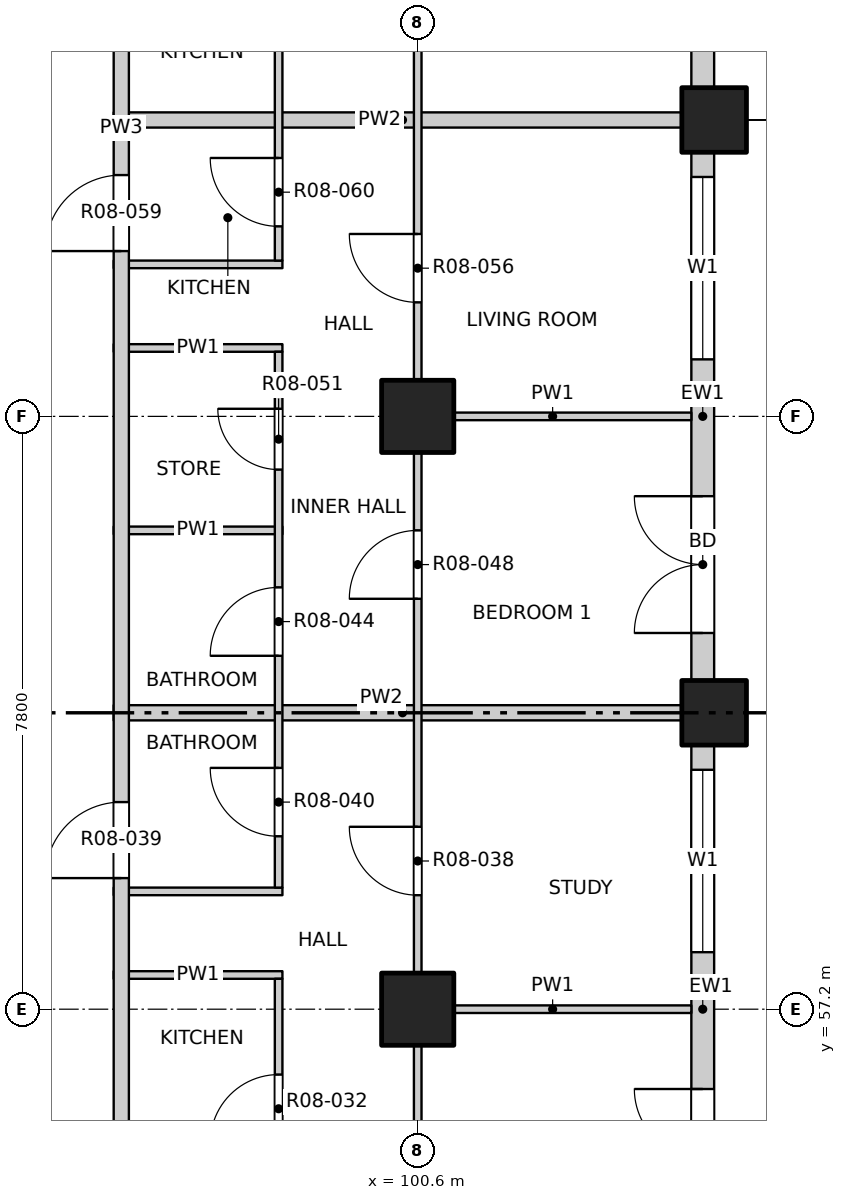
"""IFC4 building model, lengths in metres.
Left out: names, types, materials, properties, quantities, classifications, styles, units other than length and angle.
Written with IfcOpenShell. Run it as: python <this file> out.ifc"""

import sys

from ifc_helpers import new_model, si_unit, direction, frame, frame_2d, origin, origin_2d, place, context, subcontext, project, spatial, rectangle, extrude, element, fill, save


model = new_model("IFC4")
c1 = context("Model", 3, precision=1e-05, world=origin(), true_north=direction((0.0, 1.0)))
c2 = subcontext(c1, "Body", "Model", "MODEL_VIEW")
j1 = project(units=[si_unit("LENGTHUNIT", "METRE"), si_unit("PLANEANGLEUNIT", "RADIAN")], contexts=[c1])
p1 = place(None, origin())
s1 = spatial("IfcSite", under=j1, at=p1, CompositionType="ELEMENT")
p2 = place(p1, origin())
s2 = spatial("IfcBuilding", under=s1, at=p2, CompositionType="ELEMENT")
p3 = place(p2, frame((0.0, 0.0, 103.3)))
s3 = spatial("IfcBuildingStorey", under=s2, at=p3, CompositionType="ELEMENT", Elevation=103.3)
for number, where, z_axis, x_axis in (
    (1, (104.5, 61.1, -0.25), (0.0, 0.0, 1.0), (1.0, 0.0, 0.0)),
    (2, (104.5, 68.9, -0.25), (0.0, 0.0, 1.0), (1.0, 0.0, 0.0)),
):
    element("IfcColumn", number, at=place(p3, frame(where, z_axis=z_axis, x_axis=x_axis)), inside=s3, PredefinedType="COLUMN", context=c2, shape_type="SweptSolid", body=[
        extrude(rectangle(XDim=0.85, YDim=0.85, at=origin_2d()), origin(), (0.0, 0.0, 1.0), 3.4),
    ])
for number, where, z_axis, x_axis in (
    (3, (100.6, 57.2, -0.25), (0.0, 0.0, 1.0), (1.0, 0.0, 0.0)),
    (4, (100.6, 65.0, -0.25), (0.0, 0.0, 1.0), (1.0, 0.0, 0.0)),
):
    element("IfcColumn", number, at=place(p3, frame(where, z_axis=z_axis, x_axis=x_axis)), inside=s3, PredefinedType="COLUMN", context=c2, shape_type="SweptSolid", body=[
        extrude(rectangle(XDim=0.95, YDim=0.95, at=origin_2d()), origin(), (0.0, 0.0, 1.0), 3.4),
    ])
p4 = place(p3, frame((104.35, 53.725, 0.0), z_axis=(0.0, 0.0, 1.0), x_axis=(0.0, 1.0, 0.0)))
e5 = element("IfcWall", 5, at=p4, inside=s3, PredefinedType="SOLIDWALL", context=c2, shape_type="SweptSolid", body=[
    extrude(rectangle(XDim=6.95, YDim=0.3, at=frame_2d((3.475, 0.0))), origin(), (0.0, 0.0, 1.0), 2.7),
])
p5 = place(p4, frame((0.625, 0.0, 0.0)))
e6 = element("IfcOpeningElement", 6, at=p5, cuts=e5, PredefinedType="OPENING", context=c2, shape_type="SweptSolid", body=[
    extrude(rectangle(XDim=1.8, YDim=2.4, at=frame_2d((0.9, 1.2))), frame((0.0, 0.16, 0.0), z_axis=(0.0, -1.0, 0.0), x_axis=(1.0, 0.0, 0.0)), (0.0, 0.0, 1.0), 0.32),
])
p6 = place(p4, frame((4.225, 0.0, 0.9)))
e7 = element("IfcOpeningElement", 7, at=p6, cuts=e5, PredefinedType="OPENING", context=c2, shape_type="SweptSolid", body=[
    extrude(rectangle(XDim=2.4, YDim=1.8, at=frame_2d((1.2, 0.9))), frame((0.0, 0.16, 0.0), z_axis=(0.0, -1.0, 0.0), x_axis=(1.0, 0.0, 0.0)), (0.0, 0.0, 1.0), 0.32),
])
p7 = place(p3, frame((104.35, 61.525, 0.0), z_axis=(0.0, 0.0, 1.0), x_axis=(0.0, 1.0, 0.0)))
e8 = element("IfcWall", 8, at=p7, inside=s3, PredefinedType="SOLIDWALL", context=c2, shape_type="SweptSolid", body=[
    extrude(rectangle(XDim=6.95, YDim=0.3, at=frame_2d((3.475, 0.0))), origin(), (0.0, 0.0, 1.0), 2.7),
])
p8 = place(p7, frame((0.625, 0.0, 0.0)))
e9 = element("IfcOpeningElement", 9, at=p8, cuts=e8, PredefinedType="OPENING", context=c2, shape_type="SweptSolid", body=[
    extrude(rectangle(XDim=1.8, YDim=2.4, at=frame_2d((0.9, 1.2))), frame((0.0, 0.16, 0.0), z_axis=(0.0, -1.0, 0.0), x_axis=(1.0, 0.0, 0.0)), (0.0, 0.0, 1.0), 0.32),
])
p9 = place(p7, frame((4.225, 0.0, 0.9)))
e10 = element("IfcOpeningElement", 10, at=p9, cuts=e8, PredefinedType="OPENING", context=c2, shape_type="SweptSolid", body=[
    extrude(rectangle(XDim=2.4, YDim=1.8, at=frame_2d((1.2, 0.9))), frame((0.0, 0.16, 0.0), z_axis=(0.0, -1.0, 0.0), x_axis=(1.0, 0.0, 0.0)), (0.0, 0.0, 1.0), 0.32),
])
p10 = place(p3, frame((104.35, 69.325, 0.0), z_axis=(0.0, 0.0, 1.0), x_axis=(0.0, 1.0, 0.0)))
e11 = element("IfcWall", 11, at=p10, inside=s3, PredefinedType="SOLIDWALL", context=c2, shape_type="SweptSolid", body=[
    extrude(rectangle(XDim=6.95, YDim=0.3, at=frame_2d((3.475, 0.0))), origin(), (0.0, 0.0, 1.0), 2.7),
])
p11 = place(p10, frame((0.625, 0.0, 0.0)))
e12 = element("IfcOpeningElement", 12, at=p11, cuts=e11, PredefinedType="OPENING", context=c2, shape_type="SweptSolid", body=[
    extrude(rectangle(XDim=1.8, YDim=2.4, at=frame_2d((0.9, 1.2))), frame((0.0, 0.16, 0.0), z_axis=(0.0, -1.0, 0.0), x_axis=(1.0, 0.0, 0.0)), (0.0, 0.0, 1.0), 0.32),
])
p12 = place(p10, frame((4.225, 0.0, 0.9)))
e13 = element("IfcOpeningElement", 13, at=p12, cuts=e11, PredefinedType="OPENING", context=c2, shape_type="SweptSolid", body=[
    extrude(rectangle(XDim=2.4, YDim=1.8, at=frame_2d((1.2, 0.9))), frame((0.0, 0.16, 0.0), z_axis=(0.0, -1.0, 0.0), x_axis=(1.0, 0.0, 0.0)), (0.0, 0.0, 1.0), 0.32),
])
p13 = place(p3, frame((100.55, 57.2, 0.0), z_axis=(0.0, 0.0, 1.0), x_axis=(1.0, 0.0, 0.0)))
e14 = element("IfcWall", 14, at=p13, inside=s3, PredefinedType="PARTITIONING", context=c2, shape_type="SweptSolid", body=[
    extrude(rectangle(XDim=3.65, YDim=0.1, at=frame_2d((1.825, 0.0))), origin(), (0.0, 0.0, 1.0), 3.15),
])
for number, where, z_axis, x_axis in (
    (15, (96.6, 57.65, 0.0), (0.0, 0.0, 1.0), (1.0, 0.0, 0.0)),
    (16, (96.6, 58.75, 0.0), (0.0, 0.0, 1.0), (1.0, 0.0, 0.0)),
):
    element("IfcWall", number, at=place(p3, frame(where, z_axis=z_axis, x_axis=x_axis)), inside=s3, PredefinedType="PARTITIONING", context=c2, shape_type="SweptSolid", body=[
        extrude(rectangle(XDim=2.22, YDim=0.1, at=frame_2d((1.11, 0.0))), origin(), (0.0, 0.0, 1.0), 3.15),
    ])
p14 = place(p3, frame((96.6, 61.1, 0.0), z_axis=(0.0, 0.0, 1.0), x_axis=(1.0, 0.0, 0.0)))
e17 = element("IfcWall", 17, at=p14, inside=s3, PredefinedType="PARTITIONING", context=c2, shape_type="SweptSolid", body=[
    extrude(rectangle(XDim=7.6, YDim=0.2, at=frame_2d((3.8, 0.0))), origin(), (0.0, 0.0, 1.0), 2.55),
])
p15 = place(p3, frame((96.6, 63.5, 0.0), z_axis=(0.0, 0.0, 1.0), x_axis=(1.0, 0.0, 0.0)))
e18 = element("IfcWall", 18, at=p15, inside=s3, PredefinedType="PARTITIONING", context=c2, shape_type="SweptSolid", body=[
    extrude(rectangle(XDim=2.22, YDim=0.1, at=frame_2d((1.11, 0.0))), origin(), (0.0, 0.0, 1.0), 3.15),
])
p16 = place(p3, frame((100.55, 65.0, 0.0), z_axis=(0.0, 0.0, 1.0), x_axis=(1.0, 0.0, 0.0)))
e19 = element("IfcWall", 19, at=p16, inside=s3, PredefinedType="PARTITIONING", context=c2, shape_type="SweptSolid", body=[
    extrude(rectangle(XDim=3.65, YDim=0.1, at=frame_2d((1.825, 0.0))), origin(), (0.0, 0.0, 1.0), 3.15),
])
for number, where, z_axis, x_axis in (
    (20, (96.6, 65.9, 0.0), (0.0, 0.0, 1.0), (1.0, 0.0, 0.0)),
    (21, (96.6, 67.0, 0.0), (0.0, 0.0, 1.0), (1.0, 0.0, 0.0)),
):
    element("IfcWall", number, at=place(p3, frame(where, z_axis=z_axis, x_axis=x_axis)), inside=s3, PredefinedType="PARTITIONING", context=c2, shape_type="SweptSolid", body=[
        extrude(rectangle(XDim=2.22, YDim=0.1, at=frame_2d((1.11, 0.0))), origin(), (0.0, 0.0, 1.0), 3.15),
    ])
p17 = place(p3, frame((96.6, 68.9, 0.0), z_axis=(0.0, 0.0, 1.0), x_axis=(1.0, 0.0, 0.0)))
e22 = element("IfcWall", 22, at=p17, inside=s3, PredefinedType="PARTITIONING", context=c2, shape_type="SweptSolid", body=[
    extrude(rectangle(XDim=7.6, YDim=0.2, at=frame_2d((3.8, 0.0))), origin(), (0.0, 0.0, 1.0), 2.55),
])
p18 = place(p3, frame((96.7, 53.4, 0.0), z_axis=(0.0, 0.0, 1.0), x_axis=(0.0, 1.0, 0.0)))
e23 = element("IfcWall", 23, at=p18, inside=s3, PredefinedType="PARTITIONING", context=c2, shape_type="SweptSolid", body=[
    extrude(rectangle(XDim=30.8, YDim=0.2, at=frame_2d((15.4, 0.0))), origin(), (0.0, 0.0, 1.0), 3.15),
])
p19 = place(p18, frame((5.525, 0.0, 0.0)))
e24 = element("IfcOpeningElement", 24, at=p19, cuts=e23, PredefinedType="OPENING", context=c2, shape_type="SweptSolid", body=[
    extrude(rectangle(XDim=1.0, YDim=2.1, at=frame_2d((0.5, 1.05))), frame((0.0, 0.11, 0.0), z_axis=(0.0, -1.0, 0.0), x_axis=(1.0, 0.0, 0.0)), (0.0, 0.0, 1.0), 0.22),
])
p20 = place(p18, frame((13.775, 0.0, 0.0)))
e25 = element("IfcOpeningElement", 25, at=p20, cuts=e23, PredefinedType="OPENING", context=c2, shape_type="SweptSolid", body=[
    extrude(rectangle(XDim=1.0, YDim=2.1, at=frame_2d((0.5, 1.05))), frame((0.0, 0.11, 0.0), z_axis=(0.0, -1.0, 0.0), x_axis=(1.0, 0.0, 0.0)), (0.0, 0.0, 1.0), 0.22),
])
p21 = place(p18, frame((22.125, 0.0, 0.0)))
e26 = element("IfcOpeningElement", 26, at=p21, cuts=e23, PredefinedType="OPENING", context=c2, shape_type="SweptSolid", body=[
    extrude(rectangle(XDim=1.0, YDim=2.1, at=frame_2d((0.5, 1.05))), frame((0.0, 0.11, 0.0), z_axis=(0.0, -1.0, 0.0), x_axis=(1.0, 0.0, 0.0)), (0.0, 0.0, 1.0), 0.22),
])
p22 = place(p3, frame((98.77, 49.45, 0.0), z_axis=(0.0, 0.0, 1.0), x_axis=(0.0, 1.0, 0.0)))
e27 = element("IfcWall", 27, at=p22, inside=s3, PredefinedType="PARTITIONING", context=c2, shape_type="SweptSolid", body=[
    extrude(rectangle(XDim=8.15, YDim=0.1, at=frame_2d((4.075, 0.0))), origin(), (0.0, 0.0, 1.0), 3.15),
])
p23 = place(p22, frame((1.0, 0.0, 0.0)))
e28 = element("IfcOpeningElement", 28, at=p23, cuts=e27, PredefinedType="OPENING", context=c2, shape_type="SweptSolid", body=[
    extrude(rectangle(XDim=0.8, YDim=2.1, at=frame_2d((0.4, 1.05))), frame((0.0, 0.06, 0.0), z_axis=(0.0, -1.0, 0.0), x_axis=(1.0, 0.0, 0.0)), (0.0, 0.0, 1.0), 0.12),
])
p24 = place(p22, frame((3.315, 0.0, 0.0)))
e29 = element("IfcOpeningElement", 29, at=p24, cuts=e27, PredefinedType="OPENING", context=c2, shape_type="SweptSolid", body=[
    extrude(rectangle(XDim=0.9, YDim=2.1, at=frame_2d((0.45, 1.05))), frame((0.0, 0.06, 0.0), z_axis=(0.0, -1.0, 0.0), x_axis=(1.0, 0.0, 0.0)), (0.0, 0.0, 1.0), 0.12),
])
p25 = place(p22, frame((5.99, 0.0, 0.0)))
e30 = element("IfcOpeningElement", 30, at=p25, cuts=e27, PredefinedType="OPENING", context=c2, shape_type="SweptSolid", body=[
    extrude(rectangle(XDim=0.9, YDim=2.1, at=frame_2d((0.45, 1.05))), frame((0.0, 0.06, 0.0), z_axis=(0.0, -1.0, 0.0), x_axis=(1.0, 0.0, 0.0)), (0.0, 0.0, 1.0), 0.12),
])
p26 = place(p3, frame((98.77, 58.8, 0.0), z_axis=(0.0, 0.0, 1.0), x_axis=(0.0, 1.0, 0.0)))
e31 = element("IfcWall", 31, at=p26, inside=s3, PredefinedType="PARTITIONING", context=c2, shape_type="SweptSolid", body=[
    extrude(rectangle(XDim=7.05, YDim=0.1, at=frame_2d((3.525, 0.0))), origin(), (0.0, 0.0, 1.0), 3.15),
])
p27 = place(p26, frame((0.675, 0.0, 0.0)))
e32 = element("IfcOpeningElement", 32, at=p27, cuts=e31, PredefinedType="OPENING", context=c2, shape_type="SweptSolid", body=[
    extrude(rectangle(XDim=0.9, YDim=2.1, at=frame_2d((0.45, 1.05))), frame((0.0, 0.06, 0.0), z_axis=(0.0, -1.0, 0.0), x_axis=(1.0, 0.0, 0.0)), (0.0, 0.0, 1.0), 0.12),
])
p28 = place(p26, frame((3.05, 0.0, 0.0)))
e33 = element("IfcOpeningElement", 33, at=p28, cuts=e31, PredefinedType="OPENING", context=c2, shape_type="SweptSolid", body=[
    extrude(rectangle(XDim=0.9, YDim=2.1, at=frame_2d((0.45, 1.05))), frame((0.0, 0.06, 0.0), z_axis=(0.0, -1.0, 0.0), x_axis=(1.0, 0.0, 0.0)), (0.0, 0.0, 1.0), 0.12),
])
p29 = place(p26, frame((5.5, 0.0, 0.0)))
e34 = element("IfcOpeningElement", 34, at=p29, cuts=e31, PredefinedType="OPENING", context=c2, shape_type="SweptSolid", body=[
    extrude(rectangle(XDim=0.8, YDim=2.1, at=frame_2d((0.4, 1.05))), frame((0.0, 0.06, 0.0), z_axis=(0.0, -1.0, 0.0), x_axis=(1.0, 0.0, 0.0)), (0.0, 0.0, 1.0), 0.12),
])
p30 = place(p3, frame((98.77, 67.05, 0.0), z_axis=(0.0, 0.0, 1.0), x_axis=(0.0, 1.0, 0.0)))
e35 = element("IfcWall", 35, at=p30, inside=s3, PredefinedType="PARTITIONING", context=c2, shape_type="SweptSolid", body=[
    extrude(rectangle(XDim=7.15, YDim=0.1, at=frame_2d((3.575, 0.0))), origin(), (0.0, 0.0, 1.0), 3.15),
])
p31 = place(p30, frame((0.45, 0.0, 0.0)))
e36 = element("IfcOpeningElement", 36, at=p31, cuts=e35, PredefinedType="OPENING", context=c2, shape_type="SweptSolid", body=[
    extrude(rectangle(XDim=0.9, YDim=2.1, at=frame_2d((0.45, 1.05))), frame((0.0, 0.06, 0.0), z_axis=(0.0, -1.0, 0.0), x_axis=(1.0, 0.0, 0.0)), (0.0, 0.0, 1.0), 0.12),
])
p32 = place(p30, frame((3.175, 0.0, 0.0)))
e37 = element("IfcOpeningElement", 37, at=p32, cuts=e35, PredefinedType="OPENING", context=c2, shape_type="SweptSolid", body=[
    extrude(rectangle(XDim=0.9, YDim=2.1, at=frame_2d((0.45, 1.05))), frame((0.0, 0.06, 0.0), z_axis=(0.0, -1.0, 0.0), x_axis=(1.0, 0.0, 0.0)), (0.0, 0.0, 1.0), 0.12),
])
p33 = place(p30, frame((5.85, 0.0, 0.0)))
e38 = element("IfcOpeningElement", 38, at=p33, cuts=e35, PredefinedType="OPENING", context=c2, shape_type="SweptSolid", body=[
    extrude(rectangle(XDim=0.9, YDim=2.1, at=frame_2d((0.45, 1.05))), frame((0.0, 0.06, 0.0), z_axis=(0.0, -1.0, 0.0), x_axis=(1.0, 0.0, 0.0)), (0.0, 0.0, 1.0), 0.12),
])
p34 = place(p3, frame((100.6, 45.8, 0.0), z_axis=(0.0, 0.0, 1.0), x_axis=(0.0, 1.0, 0.0)))
e39 = element("IfcWall", 39, at=p34, inside=s3, PredefinedType="PARTITIONING", context=c2, shape_type="SweptSolid", body=[
    extrude(rectangle(XDim=38.4, YDim=0.1, at=frame_2d((19.2, 0.0))), origin(), (0.0, 0.0, 1.0), 3.15),
])
p35 = place(p34, frame((1.05, 0.0, 0.0)))
e40 = element("IfcOpeningElement", 40, at=p35, cuts=e39, PredefinedType="OPENING", context=c2, shape_type="SweptSolid", body=[
    extrude(rectangle(XDim=1.2, YDim=2.1, at=frame_2d((0.6, 1.05))), frame((0.0, 0.06, 0.0), z_axis=(0.0, -1.0, 0.0), x_axis=(1.0, 0.0, 0.0)), (0.0, 0.0, 1.0), 0.12),
])
p36 = place(p34, frame((5.1, 0.0, 0.0)))
e41 = element("IfcOpeningElement", 41, at=p36, cuts=e39, PredefinedType="OPENING", context=c2, shape_type="SweptSolid", body=[
    extrude(rectangle(XDim=0.9, YDim=2.1, at=frame_2d((0.45, 1.05))), frame((0.0, 0.06, 0.0), z_axis=(0.0, -1.0, 0.0), x_axis=(1.0, 0.0, 0.0)), (0.0, 0.0, 1.0), 0.12),
])
p37 = place(p34, frame((9.0, 0.0, 0.0)))
e42 = element("IfcOpeningElement", 42, at=p37, cuts=e39, PredefinedType="OPENING", context=c2, shape_type="SweptSolid", body=[
    extrude(rectangle(XDim=0.9, YDim=2.1, at=frame_2d((0.45, 1.05))), frame((0.0, 0.06, 0.0), z_axis=(0.0, -1.0, 0.0), x_axis=(1.0, 0.0, 0.0)), (0.0, 0.0, 1.0), 0.12),
])
p38 = place(p34, frame((12.9, 0.0, 0.0)))
e43 = element("IfcOpeningElement", 43, at=p38, cuts=e39, PredefinedType="OPENING", context=c2, shape_type="SweptSolid", body=[
    extrude(rectangle(XDim=0.9, YDim=2.1, at=frame_2d((0.45, 1.05))), frame((0.0, 0.06, 0.0), z_axis=(0.0, -1.0, 0.0), x_axis=(1.0, 0.0, 0.0)), (0.0, 0.0, 1.0), 0.12),
])
p39 = place(p34, frame((16.8, 0.0, 0.0)))
e44 = element("IfcOpeningElement", 44, at=p39, cuts=e39, PredefinedType="OPENING", context=c2, shape_type="SweptSolid", body=[
    extrude(rectangle(XDim=0.9, YDim=2.1, at=frame_2d((0.45, 1.05))), frame((0.0, 0.06, 0.0), z_axis=(0.0, -1.0, 0.0), x_axis=(1.0, 0.0, 0.0)), (0.0, 0.0, 1.0), 0.12),
])
p40 = place(p34, frame((20.7, 0.0, 0.0)))
e45 = element("IfcOpeningElement", 45, at=p40, cuts=e39, PredefinedType="OPENING", context=c2, shape_type="SweptSolid", body=[
    extrude(rectangle(XDim=0.9, YDim=2.1, at=frame_2d((0.45, 1.05))), frame((0.0, 0.06, 0.0), z_axis=(0.0, -1.0, 0.0), x_axis=(1.0, 0.0, 0.0)), (0.0, 0.0, 1.0), 0.12),
])
p41 = place(p34, frame((24.6, 0.0, 0.0)))
e46 = element("IfcOpeningElement", 46, at=p41, cuts=e39, PredefinedType="OPENING", context=c2, shape_type="SweptSolid", body=[
    extrude(rectangle(XDim=0.9, YDim=2.1, at=frame_2d((0.45, 1.05))), frame((0.0, 0.06, 0.0), z_axis=(0.0, -1.0, 0.0), x_axis=(1.0, 0.0, 0.0)), (0.0, 0.0, 1.0), 0.12),
])
p42 = place(p34, frame((28.5, 0.0, 0.0)))
e47 = element("IfcOpeningElement", 47, at=p42, cuts=e39, PredefinedType="OPENING", context=c2, shape_type="SweptSolid", body=[
    extrude(rectangle(XDim=0.9, YDim=2.1, at=frame_2d((0.45, 1.05))), frame((0.0, 0.06, 0.0), z_axis=(0.0, -1.0, 0.0), x_axis=(1.0, 0.0, 0.0)), (0.0, 0.0, 1.0), 0.12),
])
p43 = place(p34, frame((32.4, 0.0, 0.0)))
e48 = element("IfcOpeningElement", 48, at=p43, cuts=e39, PredefinedType="OPENING", context=c2, shape_type="SweptSolid", body=[
    extrude(rectangle(XDim=0.9, YDim=2.1, at=frame_2d((0.45, 1.05))), frame((0.0, 0.06, 0.0), z_axis=(0.0, -1.0, 0.0), x_axis=(1.0, 0.0, 0.0)), (0.0, 0.0, 1.0), 0.12),
])
p44 = place(p34, frame((36.15, 0.0, 0.0)))
e49 = element("IfcOpeningElement", 49, at=p44, cuts=e39, PredefinedType="OPENING", context=c2, shape_type="SweptSolid", body=[
    extrude(rectangle(XDim=1.2, YDim=2.1, at=frame_2d((0.6, 1.05))), frame((0.0, 0.06, 0.0), z_axis=(0.0, -1.0, 0.0), x_axis=(1.0, 0.0, 0.0)), (0.0, 0.0, 1.0), 0.12),
])
p45 = place(p5, origin())
e50 = element("IfcDoor", 50, at=p45, inside=s3, OperationType="DOUBLE_DOOR_SINGLE_SWING", PredefinedType="DOOR", context=c2, shape_type="SweptSolid", body=[
    extrude(rectangle(XDim=1.8, YDim=2.4, at=frame_2d((0.9, 1.2))), frame((0.0, 0.025, 0.0), z_axis=(0.0, -1.0, 0.0), x_axis=(1.0, 0.0, 0.0)), (0.0, 0.0, 1.0), 0.05),
])
fill(e6, e50)
p46 = place(p6, origin())
e51 = element("IfcWindow", 51, at=p46, inside=s3, PartitioningType="DOUBLE_PANEL_VERTICAL", PredefinedType="WINDOW", context=c2, shape_type="SweptSolid", body=[
    extrude(rectangle(XDim=2.4, YDim=1.8, at=frame_2d((1.2, 0.9))), frame((0.0, 0.03, 0.0), z_axis=(0.0, -1.0, 0.0), x_axis=(1.0, 0.0, 0.0)), (0.0, 0.0, 1.0), 0.06),
])
fill(e7, e51)
p47 = place(p8, origin())
e52 = element("IfcDoor", 52, at=p47, inside=s3, OperationType="DOUBLE_DOOR_SINGLE_SWING", PredefinedType="DOOR", context=c2, shape_type="SweptSolid", body=[
    extrude(rectangle(XDim=1.8, YDim=2.4, at=frame_2d((0.9, 1.2))), frame((0.0, 0.025, 0.0), z_axis=(0.0, -1.0, 0.0), x_axis=(1.0, 0.0, 0.0)), (0.0, 0.0, 1.0), 0.05),
])
fill(e9, e52)
p48 = place(p9, origin())
e53 = element("IfcWindow", 53, at=p48, inside=s3, PartitioningType="DOUBLE_PANEL_VERTICAL", PredefinedType="WINDOW", context=c2, shape_type="SweptSolid", body=[
    extrude(rectangle(XDim=2.4, YDim=1.8, at=frame_2d((1.2, 0.9))), frame((0.0, 0.03, 0.0), z_axis=(0.0, -1.0, 0.0), x_axis=(1.0, 0.0, 0.0)), (0.0, 0.0, 1.0), 0.06),
])
fill(e10, e53)
p49 = place(p25, origin())
e54 = element("IfcDoor", 54, at=p49, inside=s3, OperationType="SINGLE_SWING_LEFT", PredefinedType="DOOR", context=c2, shape_type="SweptSolid", body=[
    extrude(rectangle(XDim=0.9, YDim=2.1, at=frame_2d((0.45, 1.05))), frame((0.0, 0.025, 0.0), z_axis=(0.0, -1.0, 0.0), x_axis=(1.0, 0.0, 0.0)), (0.0, 0.0, 1.0), 0.05),
])
fill(e30, e54)
p50 = place(p38, origin())
e55 = element("IfcDoor", 55, at=p50, inside=s3, OperationType="SINGLE_SWING_RIGHT", PredefinedType="DOOR", context=c2, shape_type="SweptSolid", body=[
    extrude(rectangle(XDim=0.9, YDim=2.1, at=frame_2d((0.45, 1.05))), frame((0.0, 0.025, 0.0), z_axis=(0.0, -1.0, 0.0), x_axis=(1.0, 0.0, 0.0)), (0.0, 0.0, 1.0), 0.05),
])
fill(e43, e55)
p51 = place(p19, origin())
e56 = element("IfcDoor", 56, at=p51, inside=s3, OperationType="SINGLE_SWING_LEFT", PredefinedType="DOOR", context=c2, shape_type="SweptSolid", body=[
    extrude(rectangle(XDim=1.0, YDim=2.1, at=frame_2d((0.5, 1.05))), frame((0.0, 0.025, 0.0), z_axis=(0.0, -1.0, 0.0), x_axis=(1.0, 0.0, 0.0)), (0.0, 0.0, 1.0), 0.05),
])
fill(e24, e56)
p52 = place(p27, origin())
e57 = element("IfcDoor", 57, at=p52, inside=s3, OperationType="SINGLE_SWING_RIGHT", PredefinedType="DOOR", context=c2, shape_type="SweptSolid", body=[
    extrude(rectangle(XDim=0.9, YDim=2.1, at=frame_2d((0.45, 1.05))), frame((0.0, 0.025, 0.0), z_axis=(0.0, -1.0, 0.0), x_axis=(1.0, 0.0, 0.0)), (0.0, 0.0, 1.0), 0.05),
])
fill(e32, e57)
p53 = place(p28, origin())
e58 = element("IfcDoor", 58, at=p53, inside=s3, OperationType="SINGLE_SWING_LEFT", PredefinedType="DOOR", context=c2, shape_type="SweptSolid", body=[
    extrude(rectangle(XDim=0.9, YDim=2.1, at=frame_2d((0.45, 1.05))), frame((0.0, 0.025, 0.0), z_axis=(0.0, -1.0, 0.0), x_axis=(1.0, 0.0, 0.0)), (0.0, 0.0, 1.0), 0.05),
])
fill(e33, e58)
p54 = place(p39, origin())
e59 = element("IfcDoor", 59, at=p54, inside=s3, OperationType="SINGLE_SWING_LEFT", PredefinedType="DOOR", context=c2, shape_type="SweptSolid", body=[
    extrude(rectangle(XDim=0.9, YDim=2.1, at=frame_2d((0.45, 1.05))), frame((0.0, 0.025, 0.0), z_axis=(0.0, -1.0, 0.0), x_axis=(1.0, 0.0, 0.0)), (0.0, 0.0, 1.0), 0.05),
])
fill(e44, e59)
p55 = place(p29, origin())
e60 = element("IfcDoor", 60, at=p55, inside=s3, OperationType="SINGLE_SWING_RIGHT", PredefinedType="DOOR", context=c2, shape_type="SweptSolid", body=[
    extrude(rectangle(XDim=0.8, YDim=2.1, at=frame_2d((0.4, 1.05))), frame((0.0, 0.025, 0.0), z_axis=(0.0, -1.0, 0.0), x_axis=(1.0, 0.0, 0.0)), (0.0, 0.0, 1.0), 0.05),
])
fill(e34, e60)
p56 = place(p40, origin())
e61 = element("IfcDoor", 61, at=p56, inside=s3, OperationType="SINGLE_SWING_RIGHT", PredefinedType="DOOR", context=c2, shape_type="SweptSolid", body=[
    extrude(rectangle(XDim=0.9, YDim=2.1, at=frame_2d((0.45, 1.05))), frame((0.0, 0.025, 0.0), z_axis=(0.0, -1.0, 0.0), x_axis=(1.0, 0.0, 0.0)), (0.0, 0.0, 1.0), 0.05),
])
fill(e45, e61)
p57 = place(p20, origin())
e62 = element("IfcDoor", 62, at=p57, inside=s3, OperationType="SINGLE_SWING_LEFT", PredefinedType="DOOR", context=c2, shape_type="SweptSolid", body=[
    extrude(rectangle(XDim=1.0, YDim=2.1, at=frame_2d((0.5, 1.05))), frame((0.0, 0.025, 0.0), z_axis=(0.0, -1.0, 0.0), x_axis=(1.0, 0.0, 0.0)), (0.0, 0.0, 1.0), 0.05),
])
fill(e25, e62)
p58 = place(p31, origin())
e63 = element("IfcDoor", 63, at=p58, inside=s3, OperationType="SINGLE_SWING_RIGHT", PredefinedType="DOOR", context=c2, shape_type="SweptSolid", body=[
    extrude(rectangle(XDim=0.9, YDim=2.1, at=frame_2d((0.45, 1.05))), frame((0.0, 0.025, 0.0), z_axis=(0.0, -1.0, 0.0), x_axis=(1.0, 0.0, 0.0)), (0.0, 0.0, 1.0), 0.05),
])
fill(e36, e63)
save(model, sys.argv[1])
